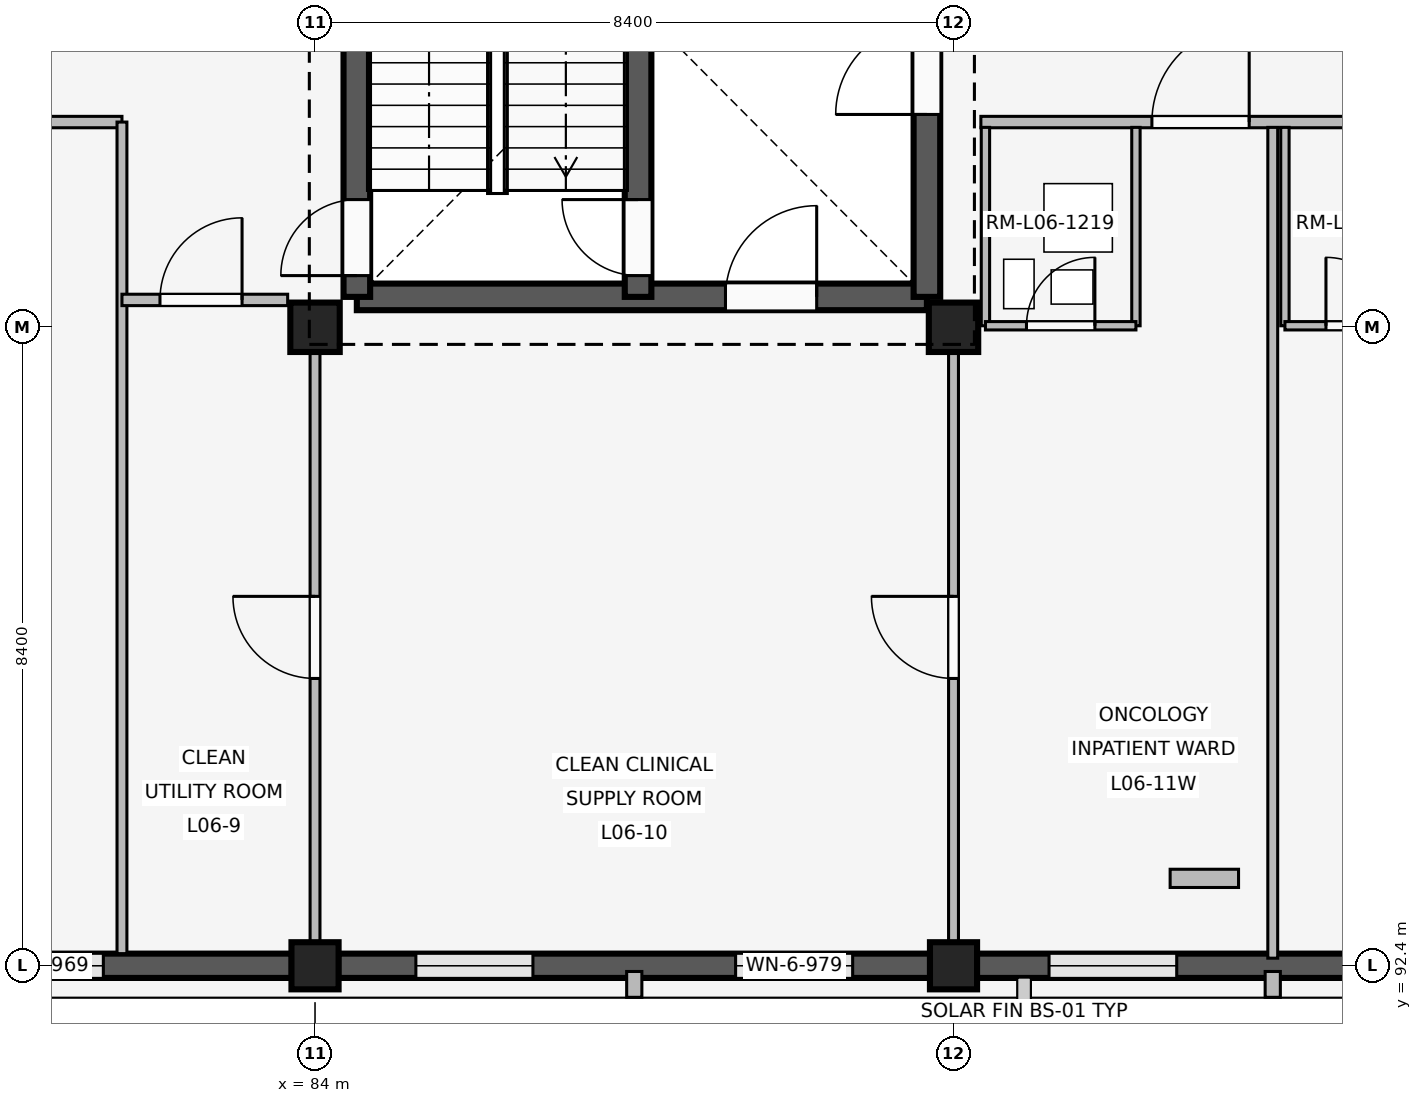
"""IFC4 building model, lengths in metres.
Left out: names, types, materials, properties, quantities, classifications, styles, units other than length and angle.
Written with IfcOpenShell. Run it as: python <this file> out.ifc"""

import sys

from ifc_helpers import new_model, si_unit, direction, frame, frame_2d, origin, origin_2d, place, context, subcontext, project, spatial, rectangle, extrude, element, fill, save


model = new_model("IFC4")
c1 = context("Model", 3, precision=1e-05, world=origin(), true_north=direction((0.0, 1.0)))
c2 = subcontext(c1, "Body", "Model", "MODEL_VIEW")
j1 = project(units=[si_unit("LENGTHUNIT", "METRE"), si_unit("PLANEANGLEUNIT", "RADIAN")], contexts=[c1])
p1 = place(None, origin())
s1 = spatial("IfcSite", under=j1, at=p1, CompositionType="ELEMENT")
p2 = place(p1, origin())
s2 = spatial("IfcBuilding", under=s1, at=p2, CompositionType="ELEMENT")
p3 = place(p2, frame((0.0, 0.0, 24.6)))
s3 = spatial("IfcBuildingStorey", under=s2, at=p3, CompositionType="ELEMENT", Elevation=24.6)
p4 = place(p3, frame((84.0, 92.4, 0.0), z_axis=(0.0, 0.0, 1.0), x_axis=(1.0, 0.0, 0.0)))
e1 = element("IfcColumn", 1, at=p4, inside=s3, PredefinedType="COLUMN", context=c2, shape_type="SweptSolid", body=[
    extrude(rectangle(XDim=0.62, YDim=0.62, at=origin_2d()), origin(), (0.0, 0.0, 1.0), 4.2),
])
p5 = place(p3, frame((84.0, 100.8, 0.0), z_axis=(0.0, 0.0, 1.0), x_axis=(1.0, 0.0, 0.0)))
e2 = element("IfcColumn", 2, at=p5, inside=s3, PredefinedType="COLUMN", context=c2, shape_type="SweptSolid", body=[
    extrude(rectangle(XDim=0.65, YDim=0.65, at=origin_2d()), origin(), (0.0, 0.0, 1.0), 4.2),
])
p6 = place(p3, frame((92.4, 92.4, 0.0), z_axis=(0.0, 0.0, 1.0), x_axis=(1.0, 0.0, 0.0)))
e3 = element("IfcColumn", 3, at=p6, inside=s3, PredefinedType="COLUMN", context=c2, shape_type="SweptSolid", body=[
    extrude(rectangle(XDim=0.62, YDim=0.62, at=origin_2d()), origin(), (0.0, 0.0, 1.0), 4.2),
])
p7 = place(p3, frame((92.4, 100.8, 0.0), z_axis=(0.0, 0.0, 1.0), x_axis=(1.0, 0.0, 0.0)))
e4 = element("IfcColumn", 4, at=p7, inside=s3, PredefinedType="COLUMN", context=c2, shape_type="SweptSolid", body=[
    extrude(rectangle(XDim=0.65, YDim=0.65, at=origin_2d()), origin(), (0.0, 0.0, 1.0), 4.2),
])
p8 = place(p3, frame((83.695, 92.4, 0.0), z_axis=(0.0, 0.0, 1.0), x_axis=(-1.0, 0.0, 0.0)))
e5 = element("IfcWall", 5, at=p8, inside=s3, PredefinedType="SOLIDWALL", context=c2, shape_type="SweptSolid", body=[
    extrude(rectangle(XDim=7.79, YDim=0.32, at=frame_2d((3.895, 0.0))), origin(), (0.0, 0.0, 1.0), 3.34),
])
p9 = place(p8, frame((2.48, 0.0, 0.85)))
e6 = element("IfcOpeningElement", 6, at=p9, cuts=e5, PredefinedType="OPENING", context=c2, shape_type="SweptSolid", body=[
    extrude(rectangle(XDim=1.66, YDim=1.95, at=frame_2d((0.83, 0.975))), frame((0.0, 0.17, 0.0), z_axis=(0.0, -1.0, 0.0), x_axis=(1.0, 0.0, 0.0)), (0.0, 0.0, 1.0), 0.34),
])
p10 = place(p8, frame((5.168, 0.0, 0.85)))
e7 = element("IfcOpeningElement", 7, at=p10, cuts=e5, PredefinedType="OPENING", context=c2, shape_type="SweptSolid", body=[
    extrude(rectangle(XDim=1.66, YDim=1.95, at=frame_2d((0.83, 0.975))), frame((0.0, 0.17, 0.0), z_axis=(0.0, -1.0, 0.0), x_axis=(1.0, 0.0, 0.0)), (0.0, 0.0, 1.0), 0.34),
])
p11 = place(p3, frame((92.095, 92.4, 0.0), z_axis=(0.0, 0.0, 1.0), x_axis=(-1.0, 0.0, 0.0)))
e8 = element("IfcWall", 8, at=p11, inside=s3, PredefinedType="SOLIDWALL", context=c2, shape_type="SweptSolid", body=[
    extrude(rectangle(XDim=7.79, YDim=0.32, at=frame_2d((3.895, 0.0))), origin(), (0.0, 0.0, 1.0), 3.34),
])
p12 = place(p11, frame((1.022, 0.0, 0.85)))
e9 = element("IfcOpeningElement", 9, at=p12, cuts=e8, PredefinedType="OPENING", context=c2, shape_type="SweptSolid", body=[
    extrude(rectangle(XDim=1.54, YDim=1.85, at=frame_2d((0.77, 0.925))), frame((0.0, 0.17, 0.0), z_axis=(0.0, -1.0, 0.0), x_axis=(1.0, 0.0, 0.0)), (0.0, 0.0, 1.0), 0.34),
])
p13 = place(p11, frame((5.228, 0.0, 0.85)))
e10 = element("IfcOpeningElement", 10, at=p13, cuts=e8, PredefinedType="OPENING", context=c2, shape_type="SweptSolid", body=[
    extrude(rectangle(XDim=1.54, YDim=1.85, at=frame_2d((0.77, 0.925))), frame((0.0, 0.17, 0.0), z_axis=(0.0, -1.0, 0.0), x_axis=(1.0, 0.0, 0.0)), (0.0, 0.0, 1.0), 0.34),
])
p14 = place(p3, frame((88.2, 92.325, 0.0), z_axis=(0.0, 0.0, 1.0), x_axis=(0.0, -1.0, 0.0)))
e11 = element("IfcWall", 11, at=p14, inside=s3, PredefinedType="ELEMENTEDWALL", context=c2, shape_type="SweptSolid", body=[
    extrude(rectangle(XDim=0.34, YDim=0.2, at=frame_2d((0.17, 0.0))), origin(), (0.0, 0.0, 1.0), 3.32),
])
p15 = place(p3, frame((100.495, 92.4, 0.0), z_axis=(0.0, 0.0, 1.0), x_axis=(-1.0, 0.0, 0.0)))
e12 = element("IfcWall", 12, at=p15, inside=s3, PredefinedType="SOLIDWALL", context=c2, shape_type="SweptSolid", body=[
    extrude(rectangle(XDim=7.79, YDim=0.32, at=frame_2d((3.895, 0.0))), origin(), (0.0, 0.0, 1.0), 3.34),
])
p16 = place(p15, frame((0.952, 0.0, 0.85)))
e13 = element("IfcOpeningElement", 13, at=p16, cuts=e12, PredefinedType="OPENING", context=c2, shape_type="SweptSolid", body=[
    extrude(rectangle(XDim=1.68, YDim=2.05, at=frame_2d((0.84, 1.025))), frame((0.0, 0.17, 0.0), z_axis=(0.0, -1.0, 0.0), x_axis=(1.0, 0.0, 0.0)), (0.0, 0.0, 1.0), 0.34),
])
p17 = place(p15, frame((5.158, 0.0, 0.85)))
e14 = element("IfcOpeningElement", 14, at=p17, cuts=e12, PredefinedType="OPENING", context=c2, shape_type="SweptSolid", body=[
    extrude(rectangle(XDim=1.68, YDim=2.05, at=frame_2d((0.84, 1.025))), frame((0.0, 0.17, 0.0), z_axis=(0.0, -1.0, 0.0), x_axis=(1.0, 0.0, 0.0)), (0.0, 0.0, 1.0), 0.34),
])
p18 = place(p3, frame((96.6, 92.325, 0.0), z_axis=(0.0, 0.0, 1.0), x_axis=(0.0, -1.0, 0.0)))
e15 = element("IfcWall", 15, at=p18, inside=s3, PredefinedType="ELEMENTEDWALL", context=c2, shape_type="SweptSolid", body=[
    extrude(rectangle(XDim=0.34, YDim=0.2, at=frame_2d((0.17, 0.0))), origin(), (0.0, 0.0, 1.0), 3.32),
])
p19 = place(p3, frame((84.55, 101.2, 0.0), z_axis=(0.0, 0.0, 1.0), x_axis=(1.0, 0.0, 0.0)))
e16 = element("IfcWall", 16, at=p19, inside=s3, PredefinedType="SHEAR", context=c2, shape_type="SweptSolid", body=[
    extrude(rectangle(XDim=7.5, YDim=0.35, at=frame_2d((3.75, 0.0))), origin(), (0.0, 0.0, 1.0), 3.92),
])
p20 = place(p19, frame((4.85, 0.0, 0.0)))
e17 = element("IfcOpeningElement", 17, at=p20, cuts=e16, PredefinedType="OPENING", context=c2, shape_type="SweptSolid", body=[
    extrude(rectangle(XDim=1.2, YDim=2.2, at=frame_2d((0.6, 1.1))), frame((0.0, 0.185, 0.0), z_axis=(0.0, -1.0, 0.0), x_axis=(1.0, 0.0, 0.0)), (0.0, 0.0, 1.0), 0.37),
])
p21 = place(p3, frame((84.55, 101.2, 0.0), z_axis=(0.0, 0.0, 1.0), x_axis=(0.0, 1.0, 0.0)))
e18 = element("IfcWall", 18, at=p21, inside=s3, PredefinedType="SHEAR", context=c2, shape_type="SweptSolid", body=[
    extrude(rectangle(XDim=7.55, YDim=0.35, at=frame_2d((3.775, 0.0))), origin(), (0.0, 0.0, 1.0), 3.92),
])
p22 = place(p21, frame((0.28, 0.0, 0.0)))
e19 = element("IfcOpeningElement", 19, at=p22, cuts=e18, PredefinedType="OPENING", context=c2, shape_type="SweptSolid", body=[
    extrude(rectangle(XDim=1.0, YDim=2.15, at=frame_2d((0.5, 1.075))), frame((0.0, 0.185, 0.0), z_axis=(0.0, -1.0, 0.0), x_axis=(1.0, 0.0, 0.0)), (0.0, 0.0, 1.0), 0.37),
])
p23 = place(p3, frame((92.05, 101.2, 0.0), z_axis=(0.0, 0.0, 1.0), x_axis=(0.0, 1.0, 0.0)))
e20 = element("IfcWall", 20, at=p23, inside=s3, PredefinedType="SHEAR", context=c2, shape_type="SweptSolid", body=[
    extrude(rectangle(XDim=7.55, YDim=0.35, at=frame_2d((3.775, 0.0))), origin(), (0.0, 0.0, 1.0), 3.92),
])
p24 = place(p23, frame((2.4, 0.0, 0.0)))
e21 = element("IfcOpeningElement", 21, at=p24, cuts=e20, PredefinedType="OPENING", context=c2, shape_type="SweptSolid", body=[
    extrude(rectangle(XDim=1.2, YDim=2.2, at=frame_2d((0.6, 1.1))), frame((0.0, 0.185, 0.0), z_axis=(0.0, -1.0, 0.0), x_axis=(1.0, 0.0, 0.0)), (0.0, 0.0, 1.0), 0.37),
])
p25 = place(p3, frame((88.25, 101.2, 0.0), z_axis=(0.0, 0.0, 1.0), x_axis=(0.0, 1.0, 0.0)))
e22 = element("IfcWall", 22, at=p25, inside=s3, PredefinedType="SHEAR", context=c2, shape_type="SweptSolid", body=[
    extrude(rectangle(XDim=7.55, YDim=0.35, at=frame_2d((3.775, 0.0))), origin(), (0.0, 0.0, 1.0), 3.92),
])
p26 = place(p25, frame((0.28, 0.0, 0.0)))
e23 = element("IfcOpeningElement", 23, at=p26, cuts=e22, PredefinedType="OPENING", context=c2, shape_type="SweptSolid", body=[
    extrude(rectangle(XDim=1.0, YDim=2.15, at=frame_2d((0.5, 1.075))), frame((0.0, 0.185, 0.0), z_axis=(0.0, -1.0, 0.0), x_axis=(1.0, 0.0, 0.0)), (0.0, 0.0, 1.0), 0.37),
])
p27 = place(p3, frame((75.68, 103.5, 0.0), z_axis=(0.0, 0.0, 1.0), x_axis=(1.0, 0.0, 0.0)))
e24 = element("IfcWall", 24, at=p27, inside=s3, PredefinedType="PARTITIONING", context=c2, shape_type="SweptSolid", body=[
    extrude(rectangle(XDim=5.78, YDim=0.15, at=frame_2d((2.89, 0.0))), origin(), (0.0, 0.0, 1.0), 3.32),
])
p28 = place(p27, frame((2.38, 0.0, 0.0)))
e25 = element("IfcOpeningElement", 25, at=p28, cuts=e24, PredefinedType="OPENING", context=c2, shape_type="SweptSolid", body=[
    extrude(rectangle(XDim=1.25, YDim=2.2, at=frame_2d((0.625, 1.1))), frame((0.0, 0.085, 0.0), z_axis=(0.0, -1.0, 0.0), x_axis=(1.0, 0.0, 0.0)), (0.0, 0.0, 1.0), 0.17),
])
p29 = place(p3, frame((81.46, 92.56, 0.0), z_axis=(0.0, 0.0, 1.0), x_axis=(0.0, 1.0, 0.0)))
e26 = element("IfcWall", 26, at=p29, inside=s3, PredefinedType="PARTITIONING", context=c2, shape_type="SweptSolid", body=[
    extrude(rectangle(XDim=10.94, YDim=0.13, at=frame_2d((5.47, 0.0))), origin(), (0.0, 0.0, 1.0), 3.32),
])
p30 = place(p3, frame((81.46, 101.16, 0.0), z_axis=(0.0, 0.0, 1.0), x_axis=(1.0, 0.0, 0.0)))
e27 = element("IfcWall", 27, at=p30, inside=s3, PredefinedType="PARTITIONING", context=c2, shape_type="SweptSolid", body=[
    extrude(rectangle(XDim=2.18, YDim=0.15, at=frame_2d((1.09, 0.0))), origin(), (0.0, 0.0, 1.0), 3.32),
])
p31 = place(p30, frame((0.5, 0.0, 0.0)))
e28 = element("IfcOpeningElement", 28, at=p31, cuts=e27, PredefinedType="OPENING", context=c2, shape_type="SweptSolid", body=[
    extrude(rectangle(XDim=1.08, YDim=2.15, at=frame_2d((0.54, 1.075))), frame((0.0, 0.085, 0.0), z_axis=(0.0, -1.0, 0.0), x_axis=(1.0, 0.0, 0.0)), (0.0, 0.0, 1.0), 0.17),
])
p32 = place(p3, frame((84.0, 92.54, 0.0), z_axis=(0.0, 0.0, 1.0), x_axis=(0.0, 1.0, 0.0)))
e29 = element("IfcWall", 29, at=p32, inside=s3, PredefinedType="PARTITIONING", context=c2, shape_type="SweptSolid", body=[
    extrude(rectangle(XDim=8.21, YDim=0.13, at=frame_2d((4.105, 0.0))), origin(), (0.0, 0.0, 1.0), 3.32),
])
p33 = place(p32, frame((3.64, 0.0, 0.0)))
e30 = element("IfcOpeningElement", 30, at=p33, cuts=e29, PredefinedType="OPENING", context=c2, shape_type="SweptSolid", body=[
    extrude(rectangle(XDim=1.08, YDim=2.15, at=frame_2d((0.54, 1.075))), frame((0.0, 0.075, 0.0), z_axis=(0.0, -1.0, 0.0), x_axis=(1.0, 0.0, 0.0)), (0.0, 0.0, 1.0), 0.15),
])
p34 = place(p3, frame((92.4, 92.54, 0.0), z_axis=(0.0, 0.0, 1.0), x_axis=(0.0, 1.0, 0.0)))
e31 = element("IfcWall", 31, at=p34, inside=s3, PredefinedType="PARTITIONING", context=c2, shape_type="SweptSolid", body=[
    extrude(rectangle(XDim=8.21, YDim=0.13, at=frame_2d((4.105, 0.0))), origin(), (0.0, 0.0, 1.0), 3.32),
])
p35 = place(p34, frame((3.64, 0.0, 0.0)))
e32 = element("IfcOpeningElement", 32, at=p35, cuts=e31, PredefinedType="OPENING", context=c2, shape_type="SweptSolid", body=[
    extrude(rectangle(XDim=1.08, YDim=2.15, at=frame_2d((0.54, 1.075))), frame((0.0, 0.075, 0.0), z_axis=(0.0, -1.0, 0.0), x_axis=(1.0, 0.0, 0.0)), (0.0, 0.0, 1.0), 0.15),
])
p36 = place(p3, frame((92.76, 103.5, 0.0), z_axis=(0.0, 0.0, 1.0), x_axis=(1.0, 0.0, 0.0)))
e33 = element("IfcWall", 33, at=p36, inside=s3, PredefinedType="PARTITIONING", context=c2, shape_type="SweptSolid", body=[
    extrude(rectangle(XDim=7.96, YDim=0.15, at=frame_2d((3.98, 0.0))), origin(), (0.0, 0.0, 1.0), 3.32),
])
p37 = place(p36, frame((2.25, 0.0, 0.0)))
e34 = element("IfcOpeningElement", 34, at=p37, cuts=e33, PredefinedType="OPENING", context=c2, shape_type="SweptSolid", body=[
    extrude(rectangle(XDim=1.28, YDim=2.2, at=frame_2d((0.64, 1.1))), frame((0.0, 0.085, 0.0), z_axis=(0.0, -1.0, 0.0), x_axis=(1.0, 0.0, 0.0)), (0.0, 0.0, 1.0), 0.17),
])
p38 = place(p36, frame((5.95, 0.0, 0.0)))
e35 = element("IfcOpeningElement", 35, at=p38, cuts=e33, PredefinedType="OPENING", context=c2, shape_type="SweptSolid", body=[
    extrude(rectangle(XDim=1.28, YDim=2.2, at=frame_2d((0.64, 1.1))), frame((0.0, 0.085, 0.0), z_axis=(0.0, -1.0, 0.0), x_axis=(1.0, 0.0, 0.0)), (0.0, 0.0, 1.0), 0.17),
])
p39 = place(p3, frame((96.6, 92.5, 0.0), z_axis=(0.0, 0.0, 1.0), x_axis=(0.0, 1.0, 0.0)))
e36 = element("IfcWall", 36, at=p39, inside=s3, PredefinedType="PARTITIONING", context=c2, shape_type="SweptSolid", body=[
    extrude(rectangle(XDim=10.93, YDim=0.13, at=frame_2d((5.465, 0.0))), origin(), (0.0, 0.0, 1.0), 3.32),
])
for number, where, z_axis, x_axis in (
    (37, (92.82, 100.82, 0.0), (0.0, 0.0, 1.0), (0.0, 1.0, 0.0)),
    (38, (94.8, 100.82, 0.0), (0.0, 0.0, 1.0), (0.0, 1.0, 0.0)),
):
    element("IfcWall", number, at=place(p3, frame(where, z_axis=z_axis, x_axis=x_axis)), inside=s3, PredefinedType="PARTITIONING", context=c2, shape_type="SweptSolid", body=[
        extrude(rectangle(XDim=2.61, YDim=0.11, at=frame_2d((1.305, 0.0))), origin(), (0.0, 0.0, 1.0), 3.32),
    ])
p40 = place(p3, frame((92.82, 100.82, 0.0), z_axis=(0.0, 0.0, 1.0), x_axis=(1.0, 0.0, 0.0)))
e39 = element("IfcWall", 39, at=p40, inside=s3, PredefinedType="PARTITIONING", context=c2, shape_type="SweptSolid", body=[
    extrude(rectangle(XDim=1.98, YDim=0.11, at=frame_2d((0.99, 0.0))), origin(), (0.0, 0.0, 1.0), 3.32),
])
p41 = place(p40, frame((0.54, 0.0, 0.0)))
e40 = element("IfcOpeningElement", 40, at=p41, cuts=e39, PredefinedType="OPENING", context=c2, shape_type="SweptSolid", body=[
    extrude(rectangle(XDim=0.9, YDim=2.1, at=frame_2d((0.45, 1.05))), frame((0.0, 0.065, 0.0), z_axis=(0.0, -1.0, 0.0), x_axis=(1.0, 0.0, 0.0)), (0.0, 0.0, 1.0), 0.13),
])
p42 = place(p3, frame((96.76, 100.82, 0.0), z_axis=(0.0, 0.0, 1.0), x_axis=(0.0, 1.0, 0.0)))
e41 = element("IfcWall", 41, at=p42, inside=s3, PredefinedType="PARTITIONING", context=c2, shape_type="SweptSolid", body=[
    extrude(rectangle(XDim=2.61, YDim=0.11, at=frame_2d((1.305, 0.0))), origin(), (0.0, 0.0, 1.0), 3.32),
])
p43 = place(p3, frame((96.76, 100.82, 0.0), z_axis=(0.0, 0.0, 1.0), x_axis=(1.0, 0.0, 0.0)))
e42 = element("IfcWall", 42, at=p43, inside=s3, PredefinedType="PARTITIONING", context=c2, shape_type="SweptSolid", body=[
    extrude(rectangle(XDim=1.98, YDim=0.11, at=frame_2d((0.99, 0.0))), origin(), (0.0, 0.0, 1.0), 3.32),
])
p44 = place(p43, frame((0.54, 0.0, 0.0)))
e43 = element("IfcOpeningElement", 43, at=p44, cuts=e42, PredefinedType="OPENING", context=c2, shape_type="SweptSolid", body=[
    extrude(rectangle(XDim=0.9, YDim=2.1, at=frame_2d((0.45, 1.05))), frame((0.0, 0.065, 0.0), z_axis=(0.0, -1.0, 0.0), x_axis=(1.0, 0.0, 0.0)), (0.0, 0.0, 1.0), 0.13),
])
p45 = place(p3, frame((95.25, 93.55, 0.0), z_axis=(0.0, 0.0, 1.0), x_axis=(1.0, 0.0, 0.0)))
e44 = element("IfcWall", 44, at=p45, inside=s3, PredefinedType="PLUMBINGWALL", context=c2, shape_type="SweptSolid", body=[
    extrude(rectangle(XDim=0.9, YDim=0.24, at=frame_2d((0.45, 0.0))), origin(), (0.0, 0.0, 1.0), 3.32),
])
p46 = place(p9, origin())
e45 = element("IfcWindow", 45, at=p46, inside=s3, PartitioningType="SINGLE_PANEL", PredefinedType="WINDOW", context=c2, shape_type="SweptSolid", body=[
    extrude(rectangle(XDim=1.66, YDim=1.95, at=frame_2d((0.83, 0.975))), frame((0.0, 0.03, 0.0), z_axis=(0.0, -1.0, 0.0), x_axis=(1.0, 0.0, 0.0)), (0.0, 0.0, 1.0), 0.06),
])
fill(e6, e45)
p47 = place(p12, origin())
e46 = element("IfcWindow", 46, at=p47, inside=s3, PartitioningType="SINGLE_PANEL", PredefinedType="WINDOW", context=c2, shape_type="SweptSolid", body=[
    extrude(rectangle(XDim=1.54, YDim=1.85, at=frame_2d((0.77, 0.925))), frame((0.0, 0.03, 0.0), z_axis=(0.0, -1.0, 0.0), x_axis=(1.0, 0.0, 0.0)), (0.0, 0.0, 1.0), 0.06),
])
fill(e9, e46)
p48 = place(p13, origin())
e47 = element("IfcWindow", 47, at=p48, inside=s3, PartitioningType="SINGLE_PANEL", PredefinedType="WINDOW", context=c2, shape_type="SweptSolid", body=[
    extrude(rectangle(XDim=1.54, YDim=1.85, at=frame_2d((0.77, 0.925))), frame((0.0, 0.03, 0.0), z_axis=(0.0, -1.0, 0.0), x_axis=(1.0, 0.0, 0.0)), (0.0, 0.0, 1.0), 0.06),
])
fill(e10, e47)
p49 = place(p17, origin())
e48 = element("IfcWindow", 48, at=p49, inside=s3, PartitioningType="SINGLE_PANEL", PredefinedType="WINDOW", context=c2, shape_type="SweptSolid", body=[
    extrude(rectangle(XDim=1.68, YDim=2.05, at=frame_2d((0.84, 1.025))), frame((0.0, 0.03, 0.0), z_axis=(0.0, -1.0, 0.0), x_axis=(1.0, 0.0, 0.0)), (0.0, 0.0, 1.0), 0.06),
])
fill(e14, e48)
p50 = place(p24, origin())
e49 = element("IfcDoor", 49, at=p50, inside=s3, OperationType="SINGLE_SWING_LEFT", PredefinedType="DOOR", context=c2, shape_type="SweptSolid", body=[
    extrude(rectangle(XDim=1.2, YDim=2.2, at=frame_2d((0.6, 1.1))), frame((0.0, 0.025, 0.0), z_axis=(0.0, -1.0, 0.0), x_axis=(1.0, 0.0, 0.0)), (0.0, 0.0, 1.0), 0.05),
])
fill(e21, e49)
p51 = place(p20, origin())
e50 = element("IfcDoor", 50, at=p51, inside=s3, OperationType="SINGLE_SWING_RIGHT", PredefinedType="DOOR", context=c2, shape_type="SweptSolid", body=[
    extrude(rectangle(XDim=1.2, YDim=2.2, at=frame_2d((0.6, 1.1))), frame((0.0, 0.025, 0.0), z_axis=(0.0, -1.0, 0.0), x_axis=(1.0, 0.0, 0.0)), (0.0, 0.0, 1.0), 0.05),
])
fill(e17, e50)
p52 = place(p22, origin())
e51 = element("IfcDoor", 51, at=p52, inside=s3, OperationType="SINGLE_SWING_LEFT", PredefinedType="DOOR", context=c2, shape_type="SweptSolid", body=[
    extrude(rectangle(XDim=1.0, YDim=2.15, at=frame_2d((0.5, 1.075))), frame((0.0, 0.025, 0.0), z_axis=(0.0, -1.0, 0.0), x_axis=(1.0, 0.0, 0.0)), (0.0, 0.0, 1.0), 0.05),
])
fill(e19, e51)
p53 = place(p26, origin())
e52 = element("IfcDoor", 52, at=p53, inside=s3, OperationType="SINGLE_SWING_RIGHT", PredefinedType="DOOR", context=c2, shape_type="SweptSolid", body=[
    extrude(rectangle(XDim=1.0, YDim=2.15, at=frame_2d((0.5, 1.075))), frame((0.0, 0.025, 0.0), z_axis=(0.0, -1.0, 0.0), x_axis=(1.0, 0.0, 0.0)), (0.0, 0.0, 1.0), 0.05),
])
fill(e23, e52)
p54 = place(p31, origin())
e53 = element("IfcDoor", 53, at=p54, inside=s3, OperationType="SINGLE_SWING_RIGHT", PredefinedType="DOOR", context=c2, shape_type="SweptSolid", body=[
    extrude(rectangle(XDim=1.08, YDim=2.15, at=frame_2d((0.54, 1.075))), frame((0.0, 0.025, 0.0), z_axis=(0.0, -1.0, 0.0), x_axis=(1.0, 0.0, 0.0)), (0.0, 0.0, 1.0), 0.05),
])
fill(e28, e53)
p55 = place(p33, origin())
e54 = element("IfcDoor", 54, at=p55, inside=s3, OperationType="SINGLE_SWING_RIGHT", PredefinedType="DOOR", context=c2, shape_type="SweptSolid", body=[
    extrude(rectangle(XDim=1.08, YDim=2.15, at=frame_2d((0.54, 1.075))), frame((0.0, 0.025, 0.0), z_axis=(0.0, -1.0, 0.0), x_axis=(1.0, 0.0, 0.0)), (0.0, 0.0, 1.0), 0.05),
])
fill(e30, e54)
p56 = place(p35, origin())
e55 = element("IfcDoor", 55, at=p56, inside=s3, OperationType="SINGLE_SWING_RIGHT", PredefinedType="DOOR", context=c2, shape_type="SweptSolid", body=[
    extrude(rectangle(XDim=1.08, YDim=2.15, at=frame_2d((0.54, 1.075))), frame((0.0, 0.025, 0.0), z_axis=(0.0, -1.0, 0.0), x_axis=(1.0, 0.0, 0.0)), (0.0, 0.0, 1.0), 0.05),
])
fill(e32, e55)
p57 = place(p37, origin())
e56 = element("IfcDoor", 56, at=p57, inside=s3, OperationType="SINGLE_SWING_RIGHT", PredefinedType="DOOR", context=c2, shape_type="SweptSolid", body=[
    extrude(rectangle(XDim=1.28, YDim=2.2, at=frame_2d((0.64, 1.1))), frame((0.0, 0.025, 0.0), z_axis=(0.0, -1.0, 0.0), x_axis=(1.0, 0.0, 0.0)), (0.0, 0.0, 1.0), 0.05),
])
fill(e34, e56)
p58 = place(p41, origin())
e57 = element("IfcDoor", 57, at=p58, inside=s3, OperationType="SINGLE_SWING_RIGHT", PredefinedType="DOOR", context=c2, shape_type="SweptSolid", body=[
    extrude(rectangle(XDim=0.9, YDim=2.1, at=frame_2d((0.45, 1.05))), frame((0.0, 0.025, 0.0), z_axis=(0.0, -1.0, 0.0), x_axis=(1.0, 0.0, 0.0)), (0.0, 0.0, 1.0), 0.05),
])
fill(e40, e57)
p59 = place(p44, origin())
e58 = element("IfcDoor", 58, at=p59, inside=s3, OperationType="SINGLE_SWING_LEFT", PredefinedType="DOOR", context=c2, shape_type="SweptSolid", body=[
    extrude(rectangle(XDim=0.9, YDim=2.1, at=frame_2d((0.45, 1.05))), frame((0.0, 0.025, 0.0), z_axis=(0.0, -1.0, 0.0), x_axis=(1.0, 0.0, 0.0)), (0.0, 0.0, 1.0), 0.05),
])
fill(e43, e58)
save(model, sys.argv[1])
